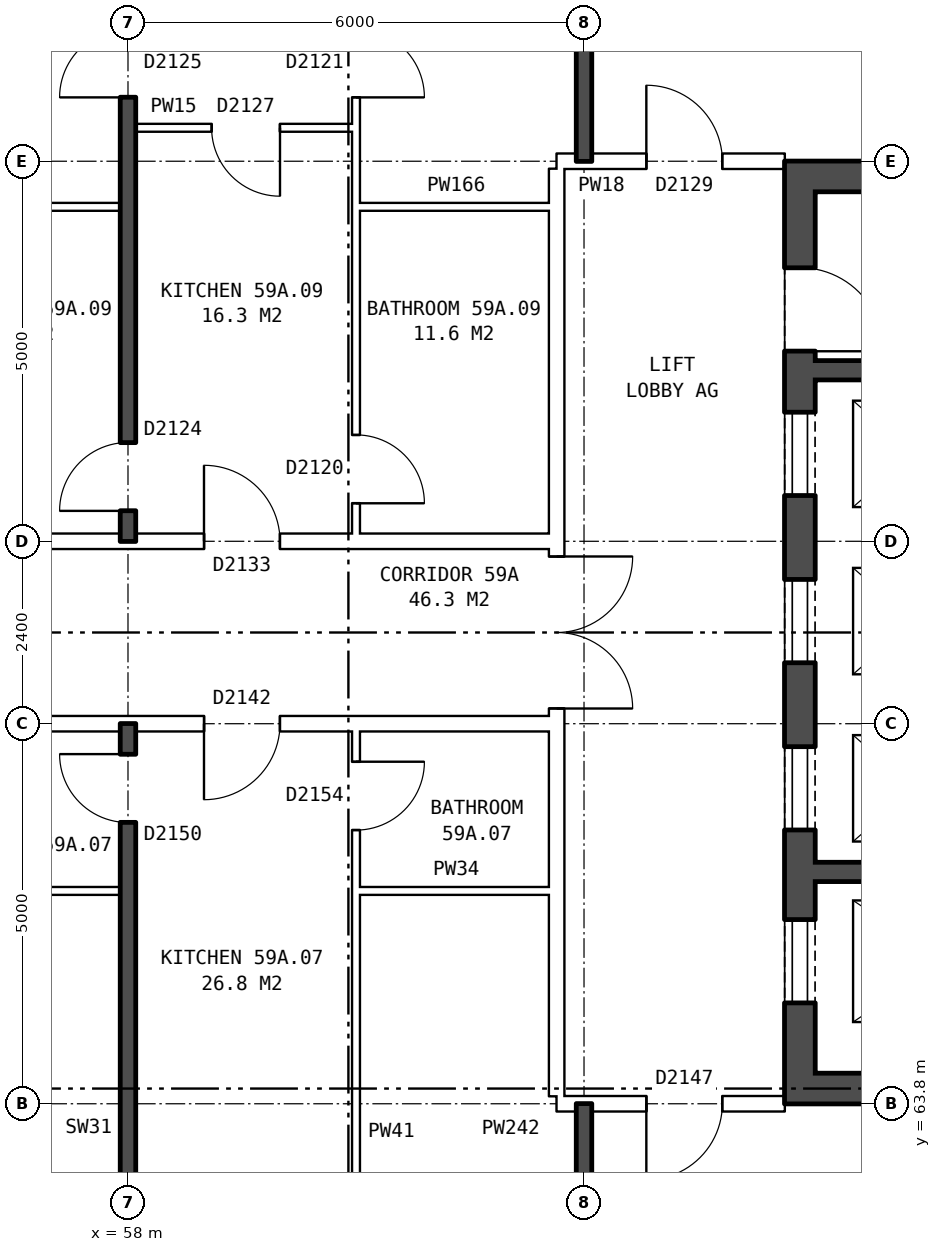
"""IFC4 building model, lengths in metres.
Left out: names, types, materials, properties, quantities, classifications, styles, units other than length and angle.
Written with IfcOpenShell. Run it as: python <this file> out.ifc"""

import sys

from ifc_helpers import new_model, si_unit, direction, frame, frame_2d, origin, place, context, subcontext, project, spatial, rectangle, extrude, element, fill, save


model = new_model("IFC4")
c1 = context("Model", 3, precision=1e-05, world=origin(), true_north=direction((0.0, 1.0)))
c2 = subcontext(c1, "Body", "Model", "MODEL_VIEW")
j1 = project(units=[si_unit("LENGTHUNIT", "METRE"), si_unit("PLANEANGLEUNIT", "RADIAN")], contexts=[c1])
p1 = place(None, origin())
s1 = spatial("IfcSite", under=j1, at=p1, CompositionType="ELEMENT")
p2 = place(p1, origin())
s2 = spatial("IfcBuilding", under=s1, at=p2, CompositionType="ELEMENT")
p3 = place(p2, frame((0.0, 0.0, 209.0)))
s3 = spatial("IfcBuildingStorey", under=s2, at=p3, CompositionType="ELEMENT", Elevation=209.0)
p4 = place(p3, frame((66.84, 63.8, 0.0), z_axis=(0.0, 0.0, 1.0), x_axis=(0.0, 1.0, 0.0)))
e1 = element("IfcWall", 1, at=p4, inside=s3, PredefinedType="SHEAR", context=c2, shape_type="SweptSolid", body=[
    extrude(rectangle(XDim=12.4, YDim=0.4, at=frame_2d((6.2, 0.0))), origin(), (0.0, 0.0, 1.0), 2.85),
])
p5 = place(p4, frame((1.325, 0.0, 0.0)))
e2 = element("IfcOpeningElement", 2, at=p5, cuts=e1, PredefinedType="OPENING", context=c2, shape_type="SweptSolid", body=[
    extrude(rectangle(XDim=1.1, YDim=2.1, at=frame_2d((0.55, 1.05))), frame((0.0, 0.21, 0.0), z_axis=(0.0, -1.0, 0.0), x_axis=(1.0, 0.0, 0.0)), (0.0, 0.0, 1.0), 0.42),
])
p6 = place(p4, frame((3.6, 0.0, 0.0)))
e3 = element("IfcOpeningElement", 3, at=p6, cuts=e1, PredefinedType="OPENING", context=c2, shape_type="SweptSolid", body=[
    extrude(rectangle(XDim=1.1, YDim=2.1, at=frame_2d((0.55, 1.05))), frame((0.0, 0.21, 0.0), z_axis=(0.0, -1.0, 0.0), x_axis=(1.0, 0.0, 0.0)), (0.0, 0.0, 1.0), 0.42),
])
p7 = place(p4, frame((5.8, 0.0, 0.0)))
e4 = element("IfcOpeningElement", 4, at=p7, cuts=e1, PredefinedType="OPENING", context=c2, shape_type="SweptSolid", body=[
    extrude(rectangle(XDim=1.1, YDim=2.1, at=frame_2d((0.55, 1.05))), frame((0.0, 0.21, 0.0), z_axis=(0.0, -1.0, 0.0), x_axis=(1.0, 0.0, 0.0)), (0.0, 0.0, 1.0), 0.42),
])
p8 = place(p4, frame((8.0, 0.0, 0.0)))
e5 = element("IfcOpeningElement", 5, at=p8, cuts=e1, PredefinedType="OPENING", context=c2, shape_type="SweptSolid", body=[
    extrude(rectangle(XDim=1.1, YDim=2.1, at=frame_2d((0.55, 1.05))), frame((0.0, 0.21, 0.0), z_axis=(0.0, -1.0, 0.0), x_axis=(1.0, 0.0, 0.0)), (0.0, 0.0, 1.0), 0.42),
])
p9 = place(p4, frame((9.9, 0.0, 0.0)))
e6 = element("IfcOpeningElement", 6, at=p9, cuts=e1, PredefinedType="OPENING", context=c2, shape_type="SweptSolid", body=[
    extrude(rectangle(XDim=1.1, YDim=2.1, at=frame_2d((0.55, 1.05))), frame((0.0, 0.21, 0.0), z_axis=(0.0, -1.0, 0.0), x_axis=(1.0, 0.0, 0.0)), (0.0, 0.0, 1.0), 0.42),
])
for number, where, z_axis, x_axis in (
    (7, (67.04, 64.0, 0.0), (0.0, 0.0, 1.0), (1.0, 0.0, 0.0)),
    (8, (67.04, 76.0, 0.0), (0.0, 0.0, 1.0), (1.0, 0.0, 0.0)),
):
    element("IfcWall", number, at=place(p3, frame(where, z_axis=z_axis, x_axis=x_axis)), inside=s3, PredefinedType="SHEAR", context=c2, shape_type="SweptSolid", body=[
        extrude(rectangle(XDim=8.2, YDim=0.4, at=frame_2d((4.1, 0.0))), origin(), (0.0, 0.0, 1.0), 2.85),
    ])
p10 = place(p3, frame((67.04, 66.85, 0.0), z_axis=(0.0, 0.0, 1.0), x_axis=(1.0, 0.0, 0.0)))
e9 = element("IfcWall", 9, at=p10, inside=s3, PredefinedType="SHEAR", context=c2, shape_type="SweptSolid", body=[
    extrude(rectangle(XDim=3.595, YDim=0.25, at=frame_2d((1.797, 0.0))), origin(), (0.0, 0.0, 1.0), 2.85),
])
p11 = place(p3, frame((67.04, 73.45, 0.0), z_axis=(0.0, 0.0, 1.0), x_axis=(1.0, 0.0, 0.0)))
e10 = element("IfcWall", 10, at=p11, inside=s3, PredefinedType="SHEAR", context=c2, shape_type="SweptSolid", body=[
    extrude(rectangle(XDim=2.525, YDim=0.25, at=frame_2d((1.262, 0.0))), origin(), (0.0, 0.0, 1.0), 2.85),
])
p12 = place(p3, frame((63.64, 63.9, 0.0), z_axis=(0.0, 0.0, 1.0), x_axis=(0.0, 1.0, 0.0)))
e11 = element("IfcWall", 11, at=p12, inside=s3, PredefinedType="PARTITIONING", context=c2, shape_type="SweptSolid", body=[
    extrude(rectangle(XDim=12.2, YDim=0.2, at=frame_2d((6.1, 0.0))), origin(), (0.0, 0.0, 1.0), 2.85),
])
p13 = place(p12, frame((5.1, 0.0, 0.0)))
e12 = element("IfcOpeningElement", 12, at=p13, cuts=e11, PredefinedType="OPENING", context=c2, shape_type="SweptSolid", body=[
    extrude(rectangle(XDim=2.0, YDim=2.1, at=frame_2d((1.0, 1.05))), frame((0.0, 0.11, 0.0), z_axis=(0.0, -1.0, 0.0), x_axis=(1.0, 0.0, 0.0)), (0.0, 0.0, 1.0), 0.22),
])
p14 = place(p3, frame((63.64, 63.8, 0.0), z_axis=(0.0, 0.0, 1.0), x_axis=(1.0, 0.0, 0.0)))
e13 = element("IfcWall", 13, at=p14, inside=s3, PredefinedType="PARTITIONING", context=c2, shape_type="SweptSolid", body=[
    extrude(rectangle(XDim=3.0, YDim=0.2, at=frame_2d((1.5, 0.0))), origin(), (0.0, 0.0, 1.0), 2.85),
])
p15 = place(p14, frame((1.18, 0.0, 0.0)))
e14 = element("IfcOpeningElement", 14, at=p15, cuts=e13, PredefinedType="OPENING", context=c2, shape_type="SweptSolid", body=[
    extrude(rectangle(XDim=1.0, YDim=2.1, at=frame_2d((0.5, 1.05))), frame((0.0, 0.11, 0.0), z_axis=(0.0, -1.0, 0.0), x_axis=(1.0, 0.0, 0.0)), (0.0, 0.0, 1.0), 0.22),
])
p16 = place(p3, frame((52.1, 66.6, 0.0), z_axis=(0.0, 0.0, 1.0), x_axis=(1.0, 0.0, 0.0)))
e15 = element("IfcWall", 15, at=p16, inside=s3, PredefinedType="PARTITIONING", context=c2, shape_type="SweptSolid", body=[
    extrude(rectangle(XDim=5.8, YDim=0.1, at=frame_2d((2.9, 0.0))), origin(), (0.0, 0.0, 1.0), 2.85),
])
p17 = place(p3, frame((61.0, 66.6, 0.0), z_axis=(0.0, 0.0, 1.0), x_axis=(1.0, 0.0, 0.0)))
e16 = element("IfcWall", 16, at=p17, inside=s3, PredefinedType="PARTITIONING", context=c2, shape_type="SweptSolid", body=[
    extrude(rectangle(XDim=2.64, YDim=0.1, at=frame_2d((1.32, 0.0))), origin(), (0.0, 0.0, 1.0), 2.85),
])
p18 = place(p3, frame((44.36, 68.8, 0.0), z_axis=(0.0, 0.0, 1.0), x_axis=(1.0, 0.0, 0.0)))
e17 = element("IfcWall", 17, at=p18, inside=s3, PredefinedType="PARTITIONING", context=c2, shape_type="SweptSolid", body=[
    extrude(rectangle(XDim=19.28, YDim=0.2, at=frame_2d((9.64, 0.0))), origin(), (0.0, 0.0, 1.0), 2.85),
])
p19 = place(p18, frame((14.64, 0.0, 0.0)))
e18 = element("IfcOpeningElement", 18, at=p19, cuts=e17, PredefinedType="OPENING", context=c2, shape_type="SweptSolid", body=[
    extrude(rectangle(XDim=1.0, YDim=2.1, at=frame_2d((0.5, 1.05))), frame((0.0, 0.11, 0.0), z_axis=(0.0, -1.0, 0.0), x_axis=(1.0, 0.0, 0.0)), (0.0, 0.0, 1.0), 0.22),
])
p20 = place(p18, frame((5.64, 0.0, 0.0)))
e19 = element("IfcOpeningElement", 19, at=p20, cuts=e17, PredefinedType="OPENING", context=c2, shape_type="SweptSolid", body=[
    extrude(rectangle(XDim=1.0, YDim=2.1, at=frame_2d((0.5, 1.05))), frame((0.0, 0.11, 0.0), z_axis=(0.0, -1.0, 0.0), x_axis=(1.0, 0.0, 0.0)), (0.0, 0.0, 1.0), 0.22),
])
p21 = place(p3, frame((44.36, 71.2, 0.0), z_axis=(0.0, 0.0, 1.0), x_axis=(1.0, 0.0, 0.0)))
e20 = element("IfcWall", 20, at=p21, inside=s3, PredefinedType="PARTITIONING", context=c2, shape_type="SweptSolid", body=[
    extrude(rectangle(XDim=19.28, YDim=0.2, at=frame_2d((9.64, 0.0))), origin(), (0.0, 0.0, 1.0), 2.85),
])
p22 = place(p21, frame((14.64, 0.0, 0.0)))
e21 = element("IfcOpeningElement", 21, at=p22, cuts=e20, PredefinedType="OPENING", context=c2, shape_type="SweptSolid", body=[
    extrude(rectangle(XDim=1.0, YDim=2.1, at=frame_2d((0.5, 1.05))), frame((0.0, 0.11, 0.0), z_axis=(0.0, -1.0, 0.0), x_axis=(1.0, 0.0, 0.0)), (0.0, 0.0, 1.0), 0.22),
])
p23 = place(p21, frame((5.64, 0.0, 0.0)))
e22 = element("IfcOpeningElement", 22, at=p23, cuts=e20, PredefinedType="OPENING", context=c2, shape_type="SweptSolid", body=[
    extrude(rectangle(XDim=1.0, YDim=2.1, at=frame_2d((0.5, 1.05))), frame((0.0, 0.11, 0.0), z_axis=(0.0, -1.0, 0.0), x_axis=(1.0, 0.0, 0.0)), (0.0, 0.0, 1.0), 0.22),
])
p24 = place(p3, frame((55.1, 75.6, 0.0), z_axis=(0.0, 0.0, 1.0), x_axis=(1.0, 0.0, 0.0)))
e23 = element("IfcWall", 23, at=p24, inside=s3, PredefinedType="PARTITIONING", context=c2, shape_type="SweptSolid", body=[
    extrude(rectangle(XDim=2.8, YDim=0.1, at=frame_2d((1.4, 0.0))), origin(), (0.0, 0.0, 1.0), 2.85),
])
p25 = place(p3, frame((61.0, 75.6, 0.0), z_axis=(0.0, 0.0, 1.0), x_axis=(1.0, 0.0, 0.0)))
e24 = element("IfcWall", 24, at=p25, inside=s3, PredefinedType="PARTITIONING", context=c2, shape_type="SweptSolid", body=[
    extrude(rectangle(XDim=2.64, YDim=0.1, at=frame_2d((1.32, 0.0))), origin(), (0.0, 0.0, 1.0), 2.85),
])
p26 = place(p3, frame((63.64, 76.2, 0.0), z_axis=(0.0, 0.0, 1.0), x_axis=(1.0, 0.0, 0.0)))
e25 = element("IfcWall", 25, at=p26, inside=s3, PredefinedType="PARTITIONING", context=c2, shape_type="SweptSolid", body=[
    extrude(rectangle(XDim=3.0, YDim=0.2, at=frame_2d((1.5, 0.0))), origin(), (0.0, 0.0, 1.0), 2.85),
])
p27 = place(p26, frame((1.18, 0.0, 0.0)))
e26 = element("IfcOpeningElement", 26, at=p27, cuts=e25, PredefinedType="OPENING", context=c2, shape_type="SweptSolid", body=[
    extrude(rectangle(XDim=1.0, YDim=2.1, at=frame_2d((0.5, 1.05))), frame((0.0, 0.11, 0.0), z_axis=(0.0, -1.0, 0.0), x_axis=(1.0, 0.0, 0.0)), (0.0, 0.0, 1.0), 0.22),
])
p28 = place(p3, frame((58.1, 76.64, 0.0), z_axis=(0.0, 0.0, 1.0), x_axis=(1.0, 0.0, 0.0)))
e27 = element("IfcWall", 27, at=p28, inside=s3, PredefinedType="PARTITIONING", context=c2, shape_type="SweptSolid", body=[
    extrude(rectangle(XDim=2.9, YDim=0.1, at=frame_2d((1.45, 0.0))), origin(), (0.0, 0.0, 1.0), 2.85),
])
p29 = place(p28, frame((1.0, 0.0, 0.0)))
e28 = element("IfcOpeningElement", 28, at=p29, cuts=e27, PredefinedType="OPENING", context=c2, shape_type="SweptSolid", body=[
    extrude(rectangle(XDim=0.9, YDim=2.1, at=frame_2d((0.45, 1.05))), frame((0.0, 0.06, 0.0), z_axis=(0.0, -1.0, 0.0), x_axis=(1.0, 0.0, 0.0)), (0.0, 0.0, 1.0), 0.12),
])
p30 = place(p3, frame((58.0, 54.36, 0.0), z_axis=(0.0, 0.0, 1.0), x_axis=(0.0, 1.0, 0.0)))
e29 = element("IfcWall", 29, at=p30, inside=s3, PredefinedType="SOLIDWALL", context=c2, shape_type="SweptSolid", body=[
    extrude(rectangle(XDim=14.44, YDim=0.2, at=frame_2d((7.22, 0.0))), origin(), (0.0, 0.0, 1.0), 2.85),
])
p31 = place(p30, frame((4.2, 0.0, 0.0)))
e30 = element("IfcOpeningElement", 30, at=p31, cuts=e29, PredefinedType="OPENING", context=c2, shape_type="SweptSolid", body=[
    extrude(rectangle(XDim=0.9, YDim=2.1, at=frame_2d((0.45, 1.05))), frame((0.0, 0.11, 0.0), z_axis=(0.0, -1.0, 0.0), x_axis=(1.0, 0.0, 0.0)), (0.0, 0.0, 1.0), 0.22),
])
p32 = place(p30, frame((13.14, 0.0, 0.0)))
e31 = element("IfcOpeningElement", 31, at=p32, cuts=e29, PredefinedType="OPENING", context=c2, shape_type="SweptSolid", body=[
    extrude(rectangle(XDim=0.9, YDim=2.1, at=frame_2d((0.45, 1.05))), frame((0.0, 0.11, 0.0), z_axis=(0.0, -1.0, 0.0), x_axis=(1.0, 0.0, 0.0)), (0.0, 0.0, 1.0), 0.22),
])
p33 = place(p3, frame((58.0, 71.2, 0.0), z_axis=(0.0, 0.0, 1.0), x_axis=(0.0, 1.0, 0.0)))
e32 = element("IfcWall", 32, at=p33, inside=s3, PredefinedType="SOLIDWALL", context=c2, shape_type="SweptSolid", body=[
    extrude(rectangle(XDim=14.44, YDim=0.2, at=frame_2d((7.22, 0.0))), origin(), (0.0, 0.0, 1.0), 2.85),
])
p34 = place(p33, frame((5.84, 0.0, 0.0)))
e33 = element("IfcOpeningElement", 33, at=p34, cuts=e32, PredefinedType="OPENING", context=c2, shape_type="SweptSolid", body=[
    extrude(rectangle(XDim=0.9, YDim=2.1, at=frame_2d((0.45, 1.05))), frame((0.0, 0.11, 0.0), z_axis=(0.0, -1.0, 0.0), x_axis=(1.0, 0.0, 0.0)), (0.0, 0.0, 1.0), 0.22),
])
p35 = place(p33, frame((0.4, 0.0, 0.0)))
e34 = element("IfcOpeningElement", 34, at=p35, cuts=e32, PredefinedType="OPENING", context=c2, shape_type="SweptSolid", body=[
    extrude(rectangle(XDim=0.9, YDim=2.1, at=frame_2d((0.45, 1.05))), frame((0.0, 0.11, 0.0), z_axis=(0.0, -1.0, 0.0), x_axis=(1.0, 0.0, 0.0)), (0.0, 0.0, 1.0), 0.22),
])
p36 = place(p3, frame((61.0, 54.36, 0.0), z_axis=(0.0, 0.0, 1.0), x_axis=(0.0, 1.0, 0.0)))
e35 = element("IfcWall", 35, at=p36, inside=s3, PredefinedType="PARTITIONING", context=c2, shape_type="SweptSolid", body=[
    extrude(rectangle(XDim=14.34, YDim=0.1, at=frame_2d((7.17, 0.0))), origin(), (0.0, 0.0, 1.0), 2.85),
])
p37 = place(p36, frame((4.2, 0.0, 0.0)))
e36 = element("IfcOpeningElement", 36, at=p37, cuts=e35, PredefinedType="OPENING", context=c2, shape_type="SweptSolid", body=[
    extrude(rectangle(XDim=0.9, YDim=2.1, at=frame_2d((0.45, 1.05))), frame((0.0, 0.06, 0.0), z_axis=(0.0, -1.0, 0.0), x_axis=(1.0, 0.0, 0.0)), (0.0, 0.0, 1.0), 0.12),
])
p38 = place(p36, frame((13.04, 0.0, 0.0)))
e37 = element("IfcOpeningElement", 37, at=p38, cuts=e35, PredefinedType="OPENING", context=c2, shape_type="SweptSolid", body=[
    extrude(rectangle(XDim=0.9, YDim=2.1, at=frame_2d((0.45, 1.05))), frame((0.0, 0.06, 0.0), z_axis=(0.0, -1.0, 0.0), x_axis=(1.0, 0.0, 0.0)), (0.0, 0.0, 1.0), 0.12),
])
p39 = place(p3, frame((61.0, 71.3, 0.0), z_axis=(0.0, 0.0, 1.0), x_axis=(0.0, 1.0, 0.0)))
e38 = element("IfcWall", 38, at=p39, inside=s3, PredefinedType="PARTITIONING", context=c2, shape_type="SweptSolid", body=[
    extrude(rectangle(XDim=14.34, YDim=0.1, at=frame_2d((7.17, 0.0))), origin(), (0.0, 0.0, 1.0), 2.85),
])
p40 = place(p39, frame((5.74, 0.0, 0.0)))
e39 = element("IfcOpeningElement", 39, at=p40, cuts=e38, PredefinedType="OPENING", context=c2, shape_type="SweptSolid", body=[
    extrude(rectangle(XDim=0.9, YDim=2.1, at=frame_2d((0.45, 1.05))), frame((0.0, 0.06, 0.0), z_axis=(0.0, -1.0, 0.0), x_axis=(1.0, 0.0, 0.0)), (0.0, 0.0, 1.0), 0.12),
])
p41 = place(p39, frame((0.4, 0.0, 0.0)))
e40 = element("IfcOpeningElement", 40, at=p41, cuts=e38, PredefinedType="OPENING", context=c2, shape_type="SweptSolid", body=[
    extrude(rectangle(XDim=0.9, YDim=2.1, at=frame_2d((0.45, 1.05))), frame((0.0, 0.06, 0.0), z_axis=(0.0, -1.0, 0.0), x_axis=(1.0, 0.0, 0.0)), (0.0, 0.0, 1.0), 0.12),
])
for number, where, z_axis, x_axis in (
    (41, (64.0, 54.36, 0.0), (0.0, 0.0, 1.0), (0.0, 1.0, 0.0)),
    (42, (64.0, 76.2, 0.0), (0.0, 0.0, 1.0), (0.0, 1.0, 0.0)),
):
    element("IfcWall", number, at=place(p3, frame(where, z_axis=z_axis, x_axis=x_axis)), inside=s3, PredefinedType="SOLIDWALL", context=c2, shape_type="SweptSolid", body=[
        extrude(rectangle(XDim=9.44, YDim=0.2, at=frame_2d((4.72, 0.0))), origin(), (0.0, 0.0, 1.0), 2.85),
    ])
p42 = place(p5, origin())
e43 = element("IfcDoor", 43, at=p42, inside=s3, OperationType="DOUBLE_DOOR_SLIDING", PredefinedType="DOOR", context=c2, shape_type="SweptSolid", body=[
    extrude(rectangle(XDim=1.1, YDim=2.1, at=frame_2d((0.55, 1.05))), frame((0.0, -0.135, 0.0), z_axis=(0.0, -1.0, 0.0), x_axis=(1.0, 0.0, 0.0)), (0.0, 0.0, 1.0), 0.05),
])
fill(e2, e43)
p43 = place(p6, origin())
e44 = element("IfcDoor", 44, at=p43, inside=s3, OperationType="DOUBLE_DOOR_SLIDING", PredefinedType="DOOR", context=c2, shape_type="SweptSolid", body=[
    extrude(rectangle(XDim=1.1, YDim=2.1, at=frame_2d((0.55, 1.05))), frame((0.0, -0.135, 0.0), z_axis=(0.0, -1.0, 0.0), x_axis=(1.0, 0.0, 0.0)), (0.0, 0.0, 1.0), 0.05),
])
fill(e3, e44)
p44 = place(p7, origin())
e45 = element("IfcDoor", 45, at=p44, inside=s3, OperationType="DOUBLE_DOOR_SLIDING", PredefinedType="DOOR", context=c2, shape_type="SweptSolid", body=[
    extrude(rectangle(XDim=1.1, YDim=2.1, at=frame_2d((0.55, 1.05))), frame((0.0, -0.135, 0.0), z_axis=(0.0, -1.0, 0.0), x_axis=(1.0, 0.0, 0.0)), (0.0, 0.0, 1.0), 0.05),
])
fill(e4, e45)
p45 = place(p8, origin())
e46 = element("IfcDoor", 46, at=p45, inside=s3, OperationType="DOUBLE_DOOR_SLIDING", PredefinedType="DOOR", context=c2, shape_type="SweptSolid", body=[
    extrude(rectangle(XDim=1.1, YDim=2.1, at=frame_2d((0.55, 1.05))), frame((0.0, -0.135, 0.0), z_axis=(0.0, -1.0, 0.0), x_axis=(1.0, 0.0, 0.0)), (0.0, 0.0, 1.0), 0.05),
])
fill(e5, e46)
p46 = place(p9, frame((1.1, 0.0, 0.0), z_axis=(0.0, 0.0, 1.0), x_axis=(-1.0, 0.0, 0.0)))
e47 = element("IfcDoor", 47, at=p46, inside=s3, OperationType="SINGLE_SWING_RIGHT", PredefinedType="DOOR", context=c2, shape_type="SweptSolid", body=[
    extrude(rectangle(XDim=1.1, YDim=2.1, at=frame_2d((0.55, 1.05))), frame((0.0, 0.185, 0.0), z_axis=(0.0, -1.0, 0.0), x_axis=(1.0, 0.0, 0.0)), (0.0, 0.0, 1.0), 0.05),
])
fill(e6, e47)
p47 = place(p13, frame((2.0, 0.0, 0.0), z_axis=(0.0, 0.0, 1.0), x_axis=(-1.0, 0.0, 0.0)))
e48 = element("IfcDoor", 48, at=p47, inside=s3, OperationType="DOUBLE_DOOR_SINGLE_SWING", PredefinedType="DOOR", context=c2, shape_type="SweptSolid", body=[
    extrude(rectangle(XDim=2.0, YDim=2.1, at=frame_2d((1.0, 1.05))), frame((0.0, 0.025, 0.0), z_axis=(0.0, -1.0, 0.0), x_axis=(1.0, 0.0, 0.0)), (0.0, 0.0, 1.0), 0.05),
])
fill(e12, e48)
p48 = place(p15, frame((1.0, 0.0, 0.0), z_axis=(0.0, 0.0, 1.0), x_axis=(-1.0, 0.0, 0.0)))
e49 = element("IfcDoor", 49, at=p48, inside=s3, OperationType="SINGLE_SWING_RIGHT", PredefinedType="DOOR", context=c2, shape_type="SweptSolid", body=[
    extrude(rectangle(XDim=1.0, YDim=2.1, at=frame_2d((0.5, 1.05))), frame((0.0, 0.025, 0.0), z_axis=(0.0, -1.0, 0.0), x_axis=(1.0, 0.0, 0.0)), (0.0, 0.0, 1.0), 0.05),
])
fill(e14, e49)
p49 = place(p27, origin())
e50 = element("IfcDoor", 50, at=p49, inside=s3, OperationType="SINGLE_SWING_LEFT", PredefinedType="DOOR", context=c2, shape_type="SweptSolid", body=[
    extrude(rectangle(XDim=1.0, YDim=2.1, at=frame_2d((0.5, 1.05))), frame((0.0, 0.025, 0.0), z_axis=(0.0, -1.0, 0.0), x_axis=(1.0, 0.0, 0.0)), (0.0, 0.0, 1.0), 0.05),
])
fill(e26, e50)
p50 = place(p19, frame((1.0, 0.0, 0.0), z_axis=(0.0, 0.0, 1.0), x_axis=(-1.0, 0.0, 0.0)))
e51 = element("IfcDoor", 51, at=p50, inside=s3, OperationType="SINGLE_SWING_RIGHT", PredefinedType="DOOR", context=c2, shape_type="SweptSolid", body=[
    extrude(rectangle(XDim=1.0, YDim=2.1, at=frame_2d((0.5, 1.05))), frame((0.0, 0.025, 0.0), z_axis=(0.0, -1.0, 0.0), x_axis=(1.0, 0.0, 0.0)), (0.0, 0.0, 1.0), 0.05),
])
fill(e18, e51)
p51 = place(p38, frame((0.9, 0.0, 0.0), z_axis=(0.0, 0.0, 1.0), x_axis=(-1.0, 0.0, 0.0)))
e52 = element("IfcDoor", 52, at=p51, inside=s3, OperationType="SINGLE_SWING_LEFT", PredefinedType="DOOR", context=c2, shape_type="SweptSolid", body=[
    extrude(rectangle(XDim=0.9, YDim=2.1, at=frame_2d((0.45, 1.05))), frame((0.0, 0.025, 0.0), z_axis=(0.0, -1.0, 0.0), x_axis=(1.0, 0.0, 0.0)), (0.0, 0.0, 1.0), 0.05),
])
fill(e37, e52)
p52 = place(p32, origin())
e53 = element("IfcDoor", 53, at=p52, inside=s3, OperationType="SINGLE_SWING_RIGHT", PredefinedType="DOOR", context=c2, shape_type="SweptSolid", body=[
    extrude(rectangle(XDim=0.9, YDim=2.1, at=frame_2d((0.45, 1.05))), frame((0.0, 0.025, 0.0), z_axis=(0.0, -1.0, 0.0), x_axis=(1.0, 0.0, 0.0)), (0.0, 0.0, 1.0), 0.05),
])
fill(e31, e53)
p53 = place(p40, frame((0.9, 0.0, 0.0), z_axis=(0.0, 0.0, 1.0), x_axis=(-1.0, 0.0, 0.0)))
e54 = element("IfcDoor", 54, at=p53, inside=s3, OperationType="SINGLE_SWING_RIGHT", PredefinedType="DOOR", context=c2, shape_type="SweptSolid", body=[
    extrude(rectangle(XDim=0.9, YDim=2.1, at=frame_2d((0.45, 1.05))), frame((0.0, 0.025, 0.0), z_axis=(0.0, -1.0, 0.0), x_axis=(1.0, 0.0, 0.0)), (0.0, 0.0, 1.0), 0.05),
])
fill(e39, e54)
p54 = place(p34, origin())
e55 = element("IfcDoor", 55, at=p54, inside=s3, OperationType="SINGLE_SWING_LEFT", PredefinedType="DOOR", context=c2, shape_type="SweptSolid", body=[
    extrude(rectangle(XDim=0.9, YDim=2.1, at=frame_2d((0.45, 1.05))), frame((0.0, 0.025, 0.0), z_axis=(0.0, -1.0, 0.0), x_axis=(1.0, 0.0, 0.0)), (0.0, 0.0, 1.0), 0.05),
])
fill(e33, e55)
p55 = place(p22, origin())
e56 = element("IfcDoor", 56, at=p55, inside=s3, OperationType="SINGLE_SWING_LEFT", PredefinedType="DOOR", context=c2, shape_type="SweptSolid", body=[
    extrude(rectangle(XDim=1.0, YDim=2.1, at=frame_2d((0.5, 1.05))), frame((0.0, 0.025, 0.0), z_axis=(0.0, -1.0, 0.0), x_axis=(1.0, 0.0, 0.0)), (0.0, 0.0, 1.0), 0.05),
])
fill(e21, e56)
p56 = place(p29, frame((0.9, 0.0, 0.0), z_axis=(0.0, 0.0, 1.0), x_axis=(-1.0, 0.0, 0.0)))
e57 = element("IfcDoor", 57, at=p56, inside=s3, OperationType="SINGLE_SWING_LEFT", PredefinedType="DOOR", context=c2, shape_type="SweptSolid", body=[
    extrude(rectangle(XDim=0.9, YDim=2.1, at=frame_2d((0.45, 1.05))), frame((0.0, 0.025, 0.0), z_axis=(0.0, -1.0, 0.0), x_axis=(1.0, 0.0, 0.0)), (0.0, 0.0, 1.0), 0.05),
])
fill(e28, e57)
p57 = place(p41, frame((0.9, 0.0, 0.0), z_axis=(0.0, 0.0, 1.0), x_axis=(-1.0, 0.0, 0.0)))
e58 = element("IfcDoor", 58, at=p57, inside=s3, OperationType="SINGLE_SWING_RIGHT", PredefinedType="DOOR", context=c2, shape_type="SweptSolid", body=[
    extrude(rectangle(XDim=0.9, YDim=2.1, at=frame_2d((0.45, 1.05))), frame((0.0, 0.025, 0.0), z_axis=(0.0, -1.0, 0.0), x_axis=(1.0, 0.0, 0.0)), (0.0, 0.0, 1.0), 0.05),
])
fill(e40, e58)
p58 = place(p35, origin())
e59 = element("IfcDoor", 59, at=p58, inside=s3, OperationType="SINGLE_SWING_LEFT", PredefinedType="DOOR", context=c2, shape_type="SweptSolid", body=[
    extrude(rectangle(XDim=0.9, YDim=2.1, at=frame_2d((0.45, 1.05))), frame((0.0, 0.025, 0.0), z_axis=(0.0, -1.0, 0.0), x_axis=(1.0, 0.0, 0.0)), (0.0, 0.0, 1.0), 0.05),
])
fill(e34, e59)
save(model, sys.argv[1])
